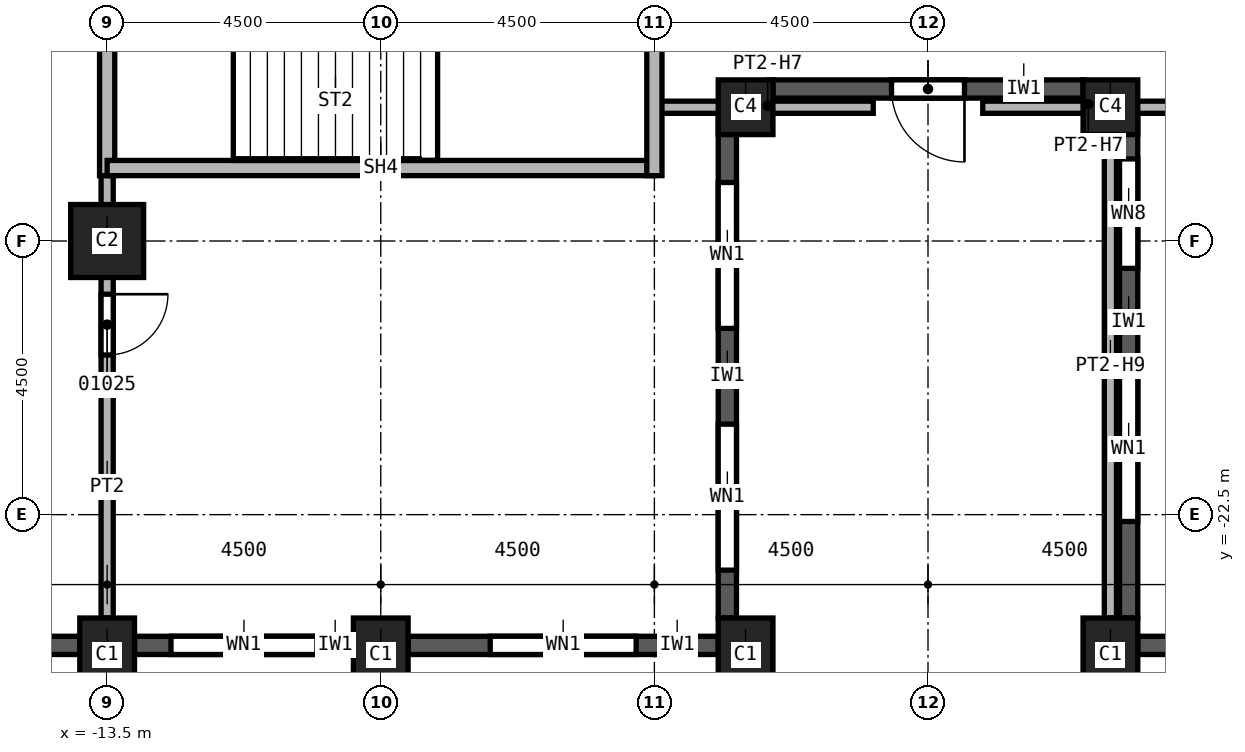
"""IFC4 building model, lengths in metres.
Left out: names, types, materials, properties, quantities, classifications, styles, units other than length and angle.
Written with IfcOpenShell. Run it as: python <this file> out.ifc"""

import sys

from ifc_helpers import new_model, si_unit, direction, frame, frame_2d, origin, origin_2d, place, context, subcontext, project, spatial, rectangle, extrude, element, fill, save


model = new_model("IFC4")
c1 = context("Model", 3, precision=1e-05, world=origin(), true_north=direction((0.0, 1.0)))
c2 = subcontext(c1, "Body", "Model", "MODEL_VIEW")
j1 = project(units=[si_unit("LENGTHUNIT", "METRE"), si_unit("PLANEANGLEUNIT", "RADIAN")], contexts=[c1])
p1 = place(None, origin())
s1 = spatial("IfcSite", under=j1, at=p1, CompositionType="ELEMENT")
p2 = place(p1, origin())
s2 = spatial("IfcBuilding", under=s1, at=p2, CompositionType="ELEMENT")
p3 = place(p2, frame((0.0, 0.0, 68.0)))
s3 = spatial("IfcBuildingStorey", under=s2, at=p3, CompositionType="ELEMENT", Elevation=68.0)
p4 = place(p3, frame((-13.5, -18.0, 0.0), z_axis=(0.0, 0.0, 1.0), x_axis=(1.0, 0.0, 0.0)))
e1 = element("IfcColumn", 1, at=p4, inside=s3, PredefinedType="COLUMN", context=c2, shape_type="SweptSolid", body=[
    extrude(rectangle(XDim=1.2, YDim=1.2, at=origin_2d()), origin(), (0.0, 0.0, 1.0), 3.7),
])
for number, where, z_axis, x_axis in (
    (2, (3.0, -24.8, 0.0), (0.0, 0.0, 1.0), (1.0, 0.0, 0.0)),
    (3, (-3.0, -24.8, 0.0), (0.0, 0.0, 1.0), (1.0, 0.0, 0.0)),
    (4, (-9.0, -24.8, 0.0), (0.0, 0.0, 1.0), (1.0, 0.0, 0.0)),
    (5, (-13.5, -24.8, 0.0), (0.0, 0.0, 1.0), (1.0, 0.0, 0.0)),
):
    element("IfcColumn", number, at=place(p3, frame(where, z_axis=z_axis, x_axis=x_axis)), inside=s3, PredefinedType="COLUMN", context=c2, shape_type="SweptSolid", body=[
        extrude(rectangle(XDim=0.9, YDim=1.2, at=origin_2d()), origin(), (0.0, 0.0, 1.0), 3.7),
    ])
for number, where, z_axis, x_axis in (
    (6, (3.0, -15.8, 0.0), (0.0, 0.0, 1.0), (1.0, 0.0, 0.0)),
    (7, (-3.0, -15.8, 0.0), (0.0, 0.0, 1.0), (1.0, 0.0, 0.0)),
):
    element("IfcColumn", number, at=place(p3, frame(where, z_axis=z_axis, x_axis=x_axis)), inside=s3, PredefinedType="COLUMN", context=c2, shape_type="SweptSolid", body=[
        extrude(rectangle(XDim=0.9, YDim=0.9, at=origin_2d()), origin(), (0.0, 0.0, 1.0), 3.7),
    ])
p5 = place(p3, frame((-17.55, -24.65, 0.0), z_axis=(0.0, 0.0, 1.0), x_axis=(1.0, 0.0, 0.0)))
e8 = element("IfcWall", 8, at=p5, inside=s3, PredefinedType="SOLIDWALL", context=c2, shape_type="SweptSolid", body=[
    extrude(rectangle(XDim=3.6, YDim=0.3, at=frame_2d((1.8, 0.0))), origin(), (0.0, 0.0, 1.0), 3.1),
])
p6 = place(p5, frame((0.775, 0.0, 0.8)))
e9 = element("IfcOpeningElement", 9, at=p6, cuts=e8, PredefinedType="OPENING", context=c2, shape_type="SweptSolid", body=[
    extrude(rectangle(XDim=1.0, YDim=1.95, at=frame_2d((0.5, 0.975))), frame((0.0, 0.15, 0.0), z_axis=(0.0, -1.0, 0.0), x_axis=(1.0, 0.0, 0.0)), (0.0, 0.0, 1.0), 0.3),
])
p7 = place(p5, frame((2.375, 0.0, 0.8)))
e10 = element("IfcOpeningElement", 10, at=p7, cuts=e8, PredefinedType="OPENING", context=c2, shape_type="SweptSolid", body=[
    extrude(rectangle(XDim=0.6, YDim=1.95, at=frame_2d((0.3, 0.975))), frame((0.0, 0.15, 0.0), z_axis=(0.0, -1.0, 0.0), x_axis=(1.0, 0.0, 0.0)), (0.0, 0.0, 1.0), 0.3),
])
p8 = place(p3, frame((-13.05, -24.65, 0.0), z_axis=(0.0, 0.0, 1.0), x_axis=(1.0, 0.0, 0.0)))
e11 = element("IfcWall", 11, at=p8, inside=s3, PredefinedType="SOLIDWALL", context=c2, shape_type="SweptSolid", body=[
    extrude(rectangle(XDim=3.6, YDim=0.3, at=frame_2d((1.8, 0.0))), origin(), (0.0, 0.0, 1.0), 3.1),
])
p9 = place(p8, frame((0.6, 0.0, 0.8)))
e12 = element("IfcOpeningElement", 12, at=p9, cuts=e11, PredefinedType="OPENING", context=c2, shape_type="SweptSolid", body=[
    extrude(rectangle(XDim=2.4, YDim=1.95, at=frame_2d((1.2, 0.975))), frame((0.0, 0.15, 0.0), z_axis=(0.0, -1.0, 0.0), x_axis=(1.0, 0.0, 0.0)), (0.0, 0.0, 1.0), 0.3),
])
p10 = place(p3, frame((-8.55, -24.65, 0.0), z_axis=(0.0, 0.0, 1.0), x_axis=(1.0, 0.0, 0.0)))
e13 = element("IfcWall", 13, at=p10, inside=s3, PredefinedType="SOLIDWALL", context=c2, shape_type="SweptSolid", body=[
    extrude(rectangle(XDim=5.1, YDim=0.3, at=frame_2d((2.55, 0.0))), origin(), (0.0, 0.0, 1.0), 3.1),
])
p11 = place(p10, frame((1.35, 0.0, 0.8)))
e14 = element("IfcOpeningElement", 14, at=p11, cuts=e13, PredefinedType="OPENING", context=c2, shape_type="SweptSolid", body=[
    extrude(rectangle(XDim=2.4, YDim=1.95, at=frame_2d((1.2, 0.975))), frame((0.0, 0.15, 0.0), z_axis=(0.0, -1.0, 0.0), x_axis=(1.0, 0.0, 0.0)), (0.0, 0.0, 1.0), 0.3),
])
p12 = place(p3, frame((-3.3, -24.2, 0.0), z_axis=(0.0, 0.0, 1.0), x_axis=(0.0, 1.0, 0.0)))
e15 = element("IfcWall", 15, at=p12, inside=s3, PredefinedType="SOLIDWALL", context=c2, shape_type="SweptSolid", body=[
    extrude(rectangle(XDim=8.35, YDim=0.3, at=frame_2d((4.175, 0.0))), origin(), (0.0, 0.0, 1.0), 3.1),
])
p13 = place(p12, frame((0.788, 0.0, 0.8)))
e16 = element("IfcOpeningElement", 16, at=p13, cuts=e15, PredefinedType="OPENING", context=c2, shape_type="SweptSolid", body=[
    extrude(rectangle(XDim=2.4, YDim=1.95, at=frame_2d((1.2, 0.975))), frame((0.0, 0.15, 0.0), z_axis=(0.0, -1.0, 0.0), x_axis=(1.0, 0.0, 0.0)), (0.0, 0.0, 1.0), 0.3),
])
p14 = place(p12, frame((4.762, 0.0, 0.8)))
e17 = element("IfcOpeningElement", 17, at=p14, cuts=e15, PredefinedType="OPENING", context=c2, shape_type="SweptSolid", body=[
    extrude(rectangle(XDim=2.4, YDim=1.95, at=frame_2d((1.2, 0.975))), frame((0.0, 0.15, 0.0), z_axis=(0.0, -1.0, 0.0), x_axis=(1.0, 0.0, 0.0)), (0.0, 0.0, 1.0), 0.3),
])
p15 = place(p3, frame((2.55, -15.5, 0.0), z_axis=(0.0, 0.0, 1.0), x_axis=(-1.0, 0.0, 0.0)))
e18 = element("IfcWall", 18, at=p15, inside=s3, PredefinedType="SOLIDWALL", context=c2, shape_type="SweptSolid", body=[
    extrude(rectangle(XDim=5.1, YDim=0.3, at=frame_2d((2.55, 0.0))), origin(), (0.0, 0.0, 1.0), 3.1),
])
p16 = place(p15, frame((1.95, 0.0, 0.0)))
e19 = element("IfcOpeningElement", 19, at=p16, cuts=e18, PredefinedType="OPENING", context=c2, shape_type="SweptSolid", body=[
    extrude(rectangle(XDim=1.2, YDim=2.4, at=frame_2d((0.6, 1.2))), frame((0.0, 0.15, 0.0), z_axis=(0.0, -1.0, 0.0), x_axis=(1.0, 0.0, 0.0)), (0.0, 0.0, 1.0), 0.3),
])
p17 = place(p3, frame((3.3, -15.85, 0.0), z_axis=(0.0, 0.0, 1.0), x_axis=(0.0, -1.0, 0.0)))
e20 = element("IfcWall", 20, at=p17, inside=s3, PredefinedType="SOLIDWALL", context=c2, shape_type="SweptSolid", body=[
    extrude(rectangle(XDim=8.35, YDim=0.3, at=frame_2d((4.175, 0.0))), origin(), (0.0, 0.0, 1.0), 3.1),
])
p18 = place(p17, frame((4.363, 0.0, 0.8)))
e21 = element("IfcOpeningElement", 21, at=p18, cuts=e20, PredefinedType="OPENING", context=c2, shape_type="SweptSolid", body=[
    extrude(rectangle(XDim=2.4, YDim=1.95, at=frame_2d((1.2, 0.975))), frame((0.0, 0.15, 0.0), z_axis=(0.0, -1.0, 0.0), x_axis=(1.0, 0.0, 0.0)), (0.0, 0.0, 1.0), 0.3),
])
p19 = place(p17, frame((0.8, 0.0, 0.8)))
e22 = element("IfcOpeningElement", 22, at=p19, cuts=e20, PredefinedType="OPENING", context=c2, shape_type="SweptSolid", body=[
    extrude(rectangle(XDim=1.8, YDim=1.95, at=frame_2d((0.9, 0.975))), frame((0.0, 0.15, 0.0), z_axis=(0.0, -1.0, 0.0), x_axis=(1.0, 0.0, 0.0)), (0.0, 0.0, 1.0), 0.3),
])
p20 = place(p3, frame((3.45, -24.65, 0.0), z_axis=(0.0, 0.0, 1.0), x_axis=(1.0, 0.0, 0.0)))
e23 = element("IfcWall", 23, at=p20, inside=s3, PredefinedType="SOLIDWALL", context=c2, shape_type="SweptSolid", body=[
    extrude(rectangle(XDim=5.1, YDim=0.3, at=frame_2d((2.55, 0.0))), origin(), (0.0, 0.0, 1.0), 3.1),
])
p21 = place(p20, frame((1.35, 0.0, 0.8)))
e24 = element("IfcOpeningElement", 24, at=p21, cuts=e23, PredefinedType="OPENING", context=c2, shape_type="SweptSolid", body=[
    extrude(rectangle(XDim=2.4, YDim=1.95, at=frame_2d((1.2, 0.975))), frame((0.0, 0.15, 0.0), z_axis=(0.0, -1.0, 0.0), x_axis=(1.0, 0.0, 0.0)), (0.0, 0.0, 1.0), 0.3),
])
p22 = place(p3, frame((-13.5, -16.675, 0.0), z_axis=(0.0, 0.0, 1.0), x_axis=(0.0, -1.0, 0.0)))
e25 = element("IfcWall", 25, at=p22, inside=s3, PredefinedType="PARTITIONING", context=c2, shape_type="SweptSolid", body=[
    extrude(rectangle(XDim=7.525, YDim=0.2, at=frame_2d((3.762, 0.0))), origin(), (0.0, 0.0, 1.0), 3.7),
])
p23 = place(p22, frame((2.2, 0.0, 0.0)))
e26 = element("IfcOpeningElement", 26, at=p23, cuts=e25, PredefinedType="OPENING", context=c2, shape_type="SweptSolid", body=[
    extrude(rectangle(XDim=1.0, YDim=2.1, at=frame_2d((0.5, 1.05))), frame((0.0, 0.1, 0.0), z_axis=(0.0, -1.0, 0.0), x_axis=(1.0, 0.0, 0.0)), (0.0, 0.0, 1.0), 0.2),
])
p24 = place(p3, frame((-0.9, -15.8, 0.0), z_axis=(0.0, 0.0, 1.0), x_axis=(-1.0, 0.0, 0.0)))
e27 = element("IfcWall", 27, at=p24, inside=s3, PredefinedType="PARTITIONING", context=c2, shape_type="SweptSolid", body=[
    extrude(rectangle(XDim=3.6, YDim=0.2, at=frame_2d((1.8, 0.0))), origin(), (0.0, 0.0, 1.0), 3.083),
])
p25 = place(p3, frame((3.0, -15.8, 0.0), z_axis=(0.0, 0.0, 1.0), x_axis=(0.0, -1.0, 0.0)))
e28 = element("IfcWall", 28, at=p25, inside=s3, PredefinedType="PARTITIONING", context=c2, shape_type="SweptSolid", body=[
    extrude(rectangle(XDim=8.4, YDim=0.2, at=frame_2d((4.2, 0.0))), origin(), (0.0, 0.0, 1.0), 2.854),
])
p26 = place(p3, frame((4.5, -15.8, 0.0), z_axis=(0.0, 0.0, 1.0), x_axis=(-1.0, 0.0, 0.0)))
e29 = element("IfcWall", 29, at=p26, inside=s3, PredefinedType="PARTITIONING", context=c2, shape_type="SweptSolid", body=[
    extrude(rectangle(XDim=3.6, YDim=0.2, at=frame_2d((1.8, 0.0))), origin(), (0.0, 0.0, 1.0), 3.083),
])
p27 = place(p3, frame((-13.5, -12.175, 0.0), z_axis=(0.0, 0.0, 1.0), x_axis=(0.0, -1.0, 0.0)))
e30 = element("IfcWall", 30, at=p27, inside=s3, PredefinedType="SOLIDWALL", context=c2, shape_type="SweptSolid", body=[
    extrude(rectangle(XDim=4.75, YDim=0.25, at=frame_2d((2.375, 0.0))), origin(), (0.0, 0.0, 1.0), 3.7),
])
p28 = place(p3, frame((-4.5, -16.8, 0.0), z_axis=(0.0, 0.0, 1.0), x_axis=(-1.0, 0.0, 0.0)))
e31 = element("IfcWall", 31, at=p28, inside=s3, PredefinedType="SOLIDWALL", context=c2, shape_type="SweptSolid", body=[
    extrude(rectangle(XDim=9.0, YDim=0.25, at=frame_2d((4.5, 0.0))), origin(), (0.0, 0.0, 1.0), 3.7),
])
p29 = place(p3, frame((-4.5, -12.3, 0.0), z_axis=(0.0, 0.0, 1.0), x_axis=(0.0, -1.0, 0.0)))
e32 = element("IfcWall", 32, at=p29, inside=s3, PredefinedType="SOLIDWALL", context=c2, shape_type="SweptSolid", body=[
    extrude(rectangle(XDim=4.625, YDim=0.25, at=frame_2d((2.312, 0.0))), origin(), (0.0, 0.0, 1.0), 3.7),
])
p30 = place(p9, origin())
e33 = element("IfcWindow", 33, at=p30, inside=s3, PartitioningType="SINGLE_PANEL", PredefinedType="WINDOW", context=c2, shape_type="SweptSolid", body=[
    extrude(rectangle(XDim=2.4, YDim=1.95, at=frame_2d((1.2, 0.975))), frame((0.0, 0.03, 0.0), z_axis=(0.0, -1.0, 0.0), x_axis=(1.0, 0.0, 0.0)), (0.0, 0.0, 1.0), 0.06),
])
fill(e12, e33)
p31 = place(p11, origin())
e34 = element("IfcWindow", 34, at=p31, inside=s3, PartitioningType="SINGLE_PANEL", PredefinedType="WINDOW", context=c2, shape_type="SweptSolid", body=[
    extrude(rectangle(XDim=2.4, YDim=1.95, at=frame_2d((1.2, 0.975))), frame((0.0, 0.03, 0.0), z_axis=(0.0, -1.0, 0.0), x_axis=(1.0, 0.0, 0.0)), (0.0, 0.0, 1.0), 0.06),
])
fill(e14, e34)
p32 = place(p13, origin())
e35 = element("IfcWindow", 35, at=p32, inside=s3, PartitioningType="SINGLE_PANEL", PredefinedType="WINDOW", context=c2, shape_type="SweptSolid", body=[
    extrude(rectangle(XDim=2.4, YDim=1.95, at=frame_2d((1.2, 0.975))), frame((0.0, 0.03, 0.0), z_axis=(0.0, -1.0, 0.0), x_axis=(1.0, 0.0, 0.0)), (0.0, 0.0, 1.0), 0.06),
])
fill(e16, e35)
p33 = place(p14, origin())
e36 = element("IfcWindow", 36, at=p33, inside=s3, PartitioningType="SINGLE_PANEL", PredefinedType="WINDOW", context=c2, shape_type="SweptSolid", body=[
    extrude(rectangle(XDim=2.4, YDim=1.95, at=frame_2d((1.2, 0.975))), frame((0.0, 0.03, 0.0), z_axis=(0.0, -1.0, 0.0), x_axis=(1.0, 0.0, 0.0)), (0.0, 0.0, 1.0), 0.06),
])
fill(e17, e36)
p34 = place(p16, origin())
e37 = element("IfcDoor", 37, at=p34, inside=s3, OperationType="SINGLE_SWING_LEFT", PredefinedType="DOOR", context=c2, shape_type="SweptSolid", body=[
    extrude(rectangle(XDim=1.2, YDim=2.4, at=frame_2d((0.6, 1.2))), frame((0.0, 0.025, 0.0), z_axis=(0.0, -1.0, 0.0), x_axis=(1.0, 0.0, 0.0)), (0.0, 0.0, 1.0), 0.05),
])
fill(e19, e37)
p35 = place(p18, origin())
e38 = element("IfcWindow", 38, at=p35, inside=s3, PartitioningType="SINGLE_PANEL", PredefinedType="WINDOW", context=c2, shape_type="SweptSolid", body=[
    extrude(rectangle(XDim=2.4, YDim=1.95, at=frame_2d((1.2, 0.975))), frame((0.0, 0.03, 0.0), z_axis=(0.0, -1.0, 0.0), x_axis=(1.0, 0.0, 0.0)), (0.0, 0.0, 1.0), 0.06),
])
fill(e21, e38)
p36 = place(p23, origin())
e39 = element("IfcDoor", 39, at=p36, inside=s3, OperationType="SINGLE_SWING_RIGHT", PredefinedType="DOOR", context=c2, shape_type="SweptSolid", body=[
    extrude(rectangle(XDim=1.0, YDim=2.1, at=frame_2d((0.5, 1.05))), frame((0.0, 0.025, 0.0), z_axis=(0.0, -1.0, 0.0), x_axis=(1.0, 0.0, 0.0)), (0.0, 0.0, 1.0), 0.05),
])
fill(e26, e39)
p37 = place(p19, origin())
e40 = element("IfcWindow", 40, at=p37, inside=s3, PartitioningType="SINGLE_PANEL", PredefinedType="WINDOW", context=c2, shape_type="SweptSolid", body=[
    extrude(rectangle(XDim=1.8, YDim=1.95, at=frame_2d((0.9, 0.975))), frame((0.0, 0.03, 0.0), z_axis=(0.0, -1.0, 0.0), x_axis=(1.0, 0.0, 0.0)), (0.0, 0.0, 1.0), 0.06),
])
fill(e22, e40)
save(model, sys.argv[1])
